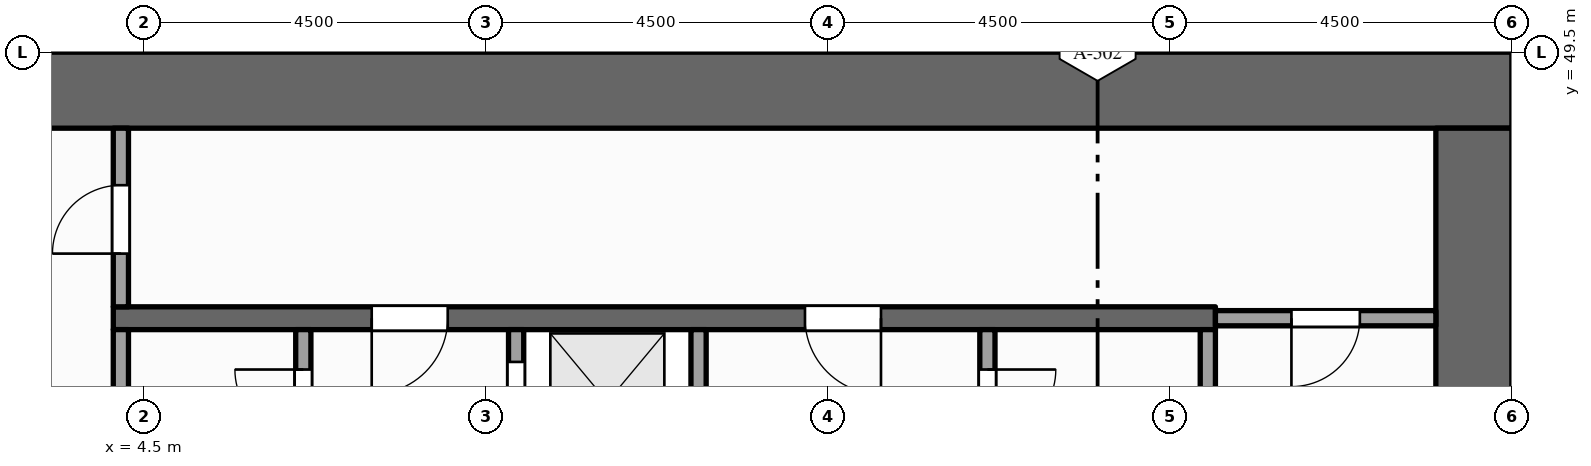
"""IFC4 building model, lengths in metres.
Left out: names, types, materials, properties, quantities, classifications, styles, units other than length and angle.
Written with IfcOpenShell. Run it as: python <this file> out.ifc"""

import sys

from ifc_helpers import new_model, si_unit, direction, frame, frame_2d, origin, place, context, subcontext, project, spatial, rectangle, extrude, element, fill, save


model = new_model("IFC4")
c1 = context("Model", 3, precision=1e-05, world=origin(), true_north=direction((0.0, 1.0)))
c2 = subcontext(c1, "Body", "Model", "MODEL_VIEW")
j1 = project(units=[si_unit("LENGTHUNIT", "METRE"), si_unit("PLANEANGLEUNIT", "RADIAN")], contexts=[c1])
p1 = place(None, origin())
s1 = spatial("IfcSite", under=j1, at=p1, CompositionType="ELEMENT")
p2 = place(p1, origin())
s2 = spatial("IfcBuilding", under=s1, at=p2, CompositionType="ELEMENT")
p3 = place(p2, frame((0.0, 0.0, 183.0)))
s3 = spatial("IfcBuildingStorey", under=s2, at=p3, CompositionType="ELEMENT", Elevation=183.0)
p4 = place(p3, frame((0.0, 49.0, -0.15), z_axis=(0.0, 0.0, 1.0), x_axis=(1.0, 0.0, 0.0)))
e1 = element("IfcWall", 1, at=p4, inside=s3, PredefinedType="SHEAR", context=c2, shape_type="SweptSolid", body=[
    extrude(rectangle(XDim=22.5, YDim=1.0, at=frame_2d((11.25, 0.0))), origin(), (0.0, 0.0, 1.0), 4.0),
])
p5 = place(p3, frame((22.0, 37.0, -0.15), z_axis=(0.0, 0.0, 1.0), x_axis=(0.0, 1.0, 0.0)))
e2 = element("IfcWall", 2, at=p5, inside=s3, PredefinedType="SHEAR", context=c2, shape_type="SweptSolid", body=[
    extrude(rectangle(XDim=11.5, YDim=1.0, at=frame_2d((5.75, 0.0))), origin(), (0.0, 0.0, 1.0), 4.0),
])
p6 = place(p3, frame((4.2, 43.525, 0.0), z_axis=(0.0, 0.0, 1.0), x_axis=(0.0, 1.0, 0.0)))
e3 = element("IfcWall", 3, at=p6, inside=s3, PredefinedType="PARTITIONING", context=c2, shape_type="SweptSolid", body=[
    extrude(rectangle(XDim=2.325, YDim=0.2, at=frame_2d((1.163, 0.0))), origin(), (0.0, 0.0, 1.0), 3.75),
])
p7 = place(p3, frame((4.2, 46.15, 0.0), z_axis=(0.0, 0.0, 1.0), x_axis=(0.0, 1.0, 0.0)))
e4 = element("IfcWall", 4, at=p7, inside=s3, PredefinedType="PARTITIONING", context=c2, shape_type="SweptSolid", body=[
    extrude(rectangle(XDim=2.35, YDim=0.2, at=frame_2d((1.175, 0.0))), origin(), (0.0, 0.0, 1.0), 3.75),
])
p8 = place(p7, frame((0.7, 0.0, 0.0)))
e5 = element("IfcOpeningElement", 5, at=p8, cuts=e4, PredefinedType="OPENING", context=c2, shape_type="SweptSolid", body=[
    extrude(rectangle(XDim=0.9, YDim=2.1, at=frame_2d((0.45, 1.05))), frame((0.0, 0.11, 0.0), z_axis=(0.0, -1.0, 0.0), x_axis=(1.0, 0.0, 0.0)), (0.0, 0.0, 1.0), 0.22),
])
p9 = place(p3, frame((6.6, 37.0, 0.0), z_axis=(0.0, 0.0, 1.0), x_axis=(0.0, 1.0, 0.0)))
e6 = element("IfcWall", 6, at=p9, inside=s3, PredefinedType="PARTITIONING", context=c2, shape_type="SweptSolid", body=[
    extrude(rectangle(XDim=8.85, YDim=0.2, at=frame_2d((4.425, 0.0))), origin(), (0.0, 0.0, 1.0), 3.75),
])
p10 = place(p9, frame((2.9, 0.0, 0.0)))
e7 = element("IfcOpeningElement", 7, at=p10, cuts=e6, PredefinedType="OPENING", context=c2, shape_type="SweptSolid", body=[
    extrude(rectangle(XDim=0.9, YDim=2.1, at=frame_2d((0.45, 1.05))), frame((0.0, 0.11, 0.0), z_axis=(0.0, -1.0, 0.0), x_axis=(1.0, 0.0, 0.0)), (0.0, 0.0, 1.0), 0.22),
])
p11 = place(p9, frame((7.425, 0.0, 0.0)))
e8 = element("IfcOpeningElement", 8, at=p11, cuts=e6, PredefinedType="OPENING", context=c2, shape_type="SweptSolid", body=[
    extrude(rectangle(XDim=0.9, YDim=2.1, at=frame_2d((0.45, 1.05))), frame((0.0, 0.11, 0.0), z_axis=(0.0, -1.0, 0.0), x_axis=(1.0, 0.0, 0.0)), (0.0, 0.0, 1.0), 0.22),
])
p12 = place(p3, frame((9.4, 37.0, 0.0), z_axis=(0.0, 0.0, 1.0), x_axis=(0.0, 1.0, 0.0)))
e9 = element("IfcWall", 9, at=p12, inside=s3, PredefinedType="SOLIDWALL", context=c2, shape_type="SweptSolid", body=[
    extrude(rectangle(XDim=8.85, YDim=0.2, at=frame_2d((4.425, 0.0))), origin(), (0.0, 0.0, 1.0), 3.75),
])
p13 = place(p12, frame((0.6, 0.0, 0.012)))
e10 = element("IfcOpeningElement", 10, at=p13, cuts=e9, PredefinedType="OPENING", context=c2, shape_type="SweptSolid", body=[
    extrude(rectangle(XDim=1.1, YDim=2.1, at=frame_2d((0.55, 1.05))), frame((0.0, 0.11, 0.0), z_axis=(0.0, -1.0, 0.0), x_axis=(1.0, 0.0, 0.0)), (0.0, 0.0, 1.0), 0.22),
])
p14 = place(p12, frame((2.95, 0.0, 0.012)))
e11 = element("IfcOpeningElement", 11, at=p14, cuts=e9, PredefinedType="OPENING", context=c2, shape_type="SweptSolid", body=[
    extrude(rectangle(XDim=1.1, YDim=2.1, at=frame_2d((0.55, 1.05))), frame((0.0, 0.11, 0.0), z_axis=(0.0, -1.0, 0.0), x_axis=(1.0, 0.0, 0.0)), (0.0, 0.0, 1.0), 0.22),
])
p15 = place(p12, frame((5.15, 0.0, 0.012)))
e12 = element("IfcOpeningElement", 12, at=p15, cuts=e9, PredefinedType="OPENING", context=c2, shape_type="SweptSolid", body=[
    extrude(rectangle(XDim=1.1, YDim=2.1, at=frame_2d((0.55, 1.05))), frame((0.0, 0.11, 0.0), z_axis=(0.0, -1.0, 0.0), x_axis=(1.0, 0.0, 0.0)), (0.0, 0.0, 1.0), 0.22),
])
p16 = place(p12, frame((7.325, 0.0, 0.012)))
e13 = element("IfcOpeningElement", 13, at=p16, cuts=e9, PredefinedType="OPENING", context=c2, shape_type="SweptSolid", body=[
    extrude(rectangle(XDim=1.1, YDim=2.1, at=frame_2d((0.55, 1.05))), frame((0.0, 0.11, 0.0), z_axis=(0.0, -1.0, 0.0), x_axis=(1.0, 0.0, 0.0)), (0.0, 0.0, 1.0), 0.22),
])
p17 = place(p3, frame((11.8, 37.0, 0.0), z_axis=(0.0, 0.0, 1.0), x_axis=(0.0, 1.0, 0.0)))
e14 = element("IfcWall", 14, at=p17, inside=s3, PredefinedType="SOLIDWALL", context=c2, shape_type="SweptSolid", body=[
    extrude(rectangle(XDim=8.85, YDim=0.2, at=frame_2d((4.425, 0.0))), origin(), (0.0, 0.0, 1.0), 3.75),
])
p18 = place(p3, frame((15.6, 43.9, 0.0), z_axis=(0.0, 0.0, 1.0), x_axis=(0.0, 1.0, 0.0)))
e15 = element("IfcWall", 15, at=p18, inside=s3, PredefinedType="PARTITIONING", context=c2, shape_type="SweptSolid", body=[
    extrude(rectangle(XDim=1.95, YDim=0.2, at=frame_2d((0.975, 0.0))), origin(), (0.0, 0.0, 1.0), 3.75),
])
p19 = place(p18, frame((0.525, 0.0, 0.0)))
e16 = element("IfcOpeningElement", 16, at=p19, cuts=e15, PredefinedType="OPENING", context=c2, shape_type="SweptSolid", body=[
    extrude(rectangle(XDim=0.9, YDim=2.1, at=frame_2d((0.45, 1.05))), frame((0.0, 0.11, 0.0), z_axis=(0.0, -1.0, 0.0), x_axis=(1.0, 0.0, 0.0)), (0.0, 0.0, 1.0), 0.22),
])
p20 = place(p3, frame((18.5, 43.9, 0.0), z_axis=(0.0, 0.0, 1.0), x_axis=(0.0, 1.0, 0.0)))
e17 = element("IfcWall", 17, at=p20, inside=s3, PredefinedType="PARTITIONING", context=c2, shape_type="SweptSolid", body=[
    extrude(rectangle(XDim=1.95, YDim=0.2, at=frame_2d((0.975, 0.0))), origin(), (0.0, 0.0, 1.0), 3.75),
])
p21 = place(p3, frame((4.1, 46.0, 0.0), z_axis=(0.0, 0.0, 1.0), x_axis=(1.0, 0.0, 0.0)))
e18 = element("IfcWall", 18, at=p21, inside=s3, PredefinedType="SHEAR", context=c2, shape_type="SweptSolid", body=[
    extrude(rectangle(XDim=14.5, YDim=0.3, at=frame_2d((7.25, 0.0))), origin(), (0.0, 0.0, 1.0), 3.75),
])
p22 = place(p21, frame((3.4, 0.0, 0.0)))
e19 = element("IfcOpeningElement", 19, at=p22, cuts=e18, PredefinedType="OPENING", context=c2, shape_type="SweptSolid", body=[
    extrude(rectangle(XDim=1.0, YDim=2.1, at=frame_2d((0.5, 1.05))), frame((0.0, 0.16, 0.0), z_axis=(0.0, -1.0, 0.0), x_axis=(1.0, 0.0, 0.0)), (0.0, 0.0, 1.0), 0.32),
])
p23 = place(p21, frame((9.1, 0.0, 0.0)))
e20 = element("IfcOpeningElement", 20, at=p23, cuts=e18, PredefinedType="OPENING", context=c2, shape_type="SweptSolid", body=[
    extrude(rectangle(XDim=1.0, YDim=2.1, at=frame_2d((0.5, 1.05))), frame((0.0, 0.16, 0.0), z_axis=(0.0, -1.0, 0.0), x_axis=(1.0, 0.0, 0.0)), (0.0, 0.0, 1.0), 0.32),
])
p24 = place(p3, frame((18.6, 46.0, 0.0), z_axis=(0.0, 0.0, 1.0), x_axis=(1.0, 0.0, 0.0)))
e21 = element("IfcWall", 21, at=p24, inside=s3, PredefinedType="PARTITIONING", context=c2, shape_type="SweptSolid", body=[
    extrude(rectangle(XDim=2.9, YDim=0.2, at=frame_2d((1.45, 0.0))), origin(), (0.0, 0.0, 1.0), 3.75),
])
p25 = place(p24, frame((1.0, 0.0, 0.0)))
e22 = element("IfcOpeningElement", 22, at=p25, cuts=e21, PredefinedType="OPENING", context=c2, shape_type="SweptSolid", body=[
    extrude(rectangle(XDim=0.9, YDim=2.1, at=frame_2d((0.45, 1.05))), frame((0.0, 0.11, 0.0), z_axis=(0.0, -1.0, 0.0), x_axis=(1.0, 0.0, 0.0)), (0.0, 0.0, 1.0), 0.22),
])
p26 = place(p16, origin())
e23 = element("IfcDoor", 23, at=p26, inside=s3, OperationType="SLIDING_TO_LEFT", PredefinedType="DOOR", context=c2, shape_type="SweptSolid", body=[
    extrude(rectangle(XDim=1.1, YDim=2.1, at=frame_2d((0.55, 1.05))), frame((0.0, 0.025, 0.0), z_axis=(0.0, -1.0, 0.0), x_axis=(1.0, 0.0, 0.0)), (0.0, 0.0, 1.0), 0.05),
])
fill(e13, e23)
p27 = place(p22, origin())
e24 = element("IfcDoor", 24, at=p27, inside=s3, OperationType="SINGLE_SWING_LEFT", PredefinedType="DOOR", context=c2, shape_type="SweptSolid", body=[
    extrude(rectangle(XDim=1.0, YDim=2.1, at=frame_2d((0.5, 1.05))), frame((0.0, 0.025, 0.0), z_axis=(0.0, -1.0, 0.0), x_axis=(1.0, 0.0, 0.0)), (0.0, 0.0, 1.0), 0.05),
])
fill(e19, e24)
p28 = place(p23, origin())
e25 = element("IfcDoor", 25, at=p28, inside=s3, OperationType="SINGLE_SWING_RIGHT", PredefinedType="DOOR", context=c2, shape_type="SweptSolid", body=[
    extrude(rectangle(XDim=1.0, YDim=2.1, at=frame_2d((0.5, 1.05))), frame((0.0, 0.025, 0.0), z_axis=(0.0, -1.0, 0.0), x_axis=(1.0, 0.0, 0.0)), (0.0, 0.0, 1.0), 0.05),
])
fill(e20, e25)
p29 = place(p8, origin())
e26 = element("IfcDoor", 26, at=p29, inside=s3, OperationType="SINGLE_SWING_LEFT", PredefinedType="DOOR", context=c2, shape_type="SweptSolid", body=[
    extrude(rectangle(XDim=0.9, YDim=2.1, at=frame_2d((0.45, 1.05))), frame((0.0, 0.025, 0.0), z_axis=(0.0, -1.0, 0.0), x_axis=(1.0, 0.0, 0.0)), (0.0, 0.0, 1.0), 0.05),
])
fill(e5, e26)
p30 = place(p25, origin())
e27 = element("IfcDoor", 27, at=p30, inside=s3, OperationType="SINGLE_SWING_LEFT", PredefinedType="DOOR", context=c2, shape_type="SweptSolid", body=[
    extrude(rectangle(XDim=0.9, YDim=2.1, at=frame_2d((0.45, 1.05))), frame((0.0, 0.025, 0.0), z_axis=(0.0, -1.0, 0.0), x_axis=(1.0, 0.0, 0.0)), (0.0, 0.0, 1.0), 0.05),
])
fill(e22, e27)
p31 = place(p11, origin())
e28 = element("IfcDoor", 28, at=p31, inside=s3, OperationType="SINGLE_SWING_RIGHT", PredefinedType="DOOR", context=c2, shape_type="SweptSolid", body=[
    extrude(rectangle(XDim=0.9, YDim=2.1, at=frame_2d((0.45, 1.05))), frame((0.0, 0.025, 0.0), z_axis=(0.0, -1.0, 0.0), x_axis=(1.0, 0.0, 0.0)), (0.0, 0.0, 1.0), 0.05),
])
fill(e8, e28)
p32 = place(p19, origin())
e29 = element("IfcDoor", 29, at=p32, inside=s3, OperationType="SINGLE_SWING_RIGHT", PredefinedType="DOOR", context=c2, shape_type="SweptSolid", body=[
    extrude(rectangle(XDim=0.9, YDim=2.1, at=frame_2d((0.45, 1.05))), frame((0.0, 0.025, 0.0), z_axis=(0.0, -1.0, 0.0), x_axis=(1.0, 0.0, 0.0)), (0.0, 0.0, 1.0), 0.05),
])
fill(e16, e29)
save(model, sys.argv[1])
